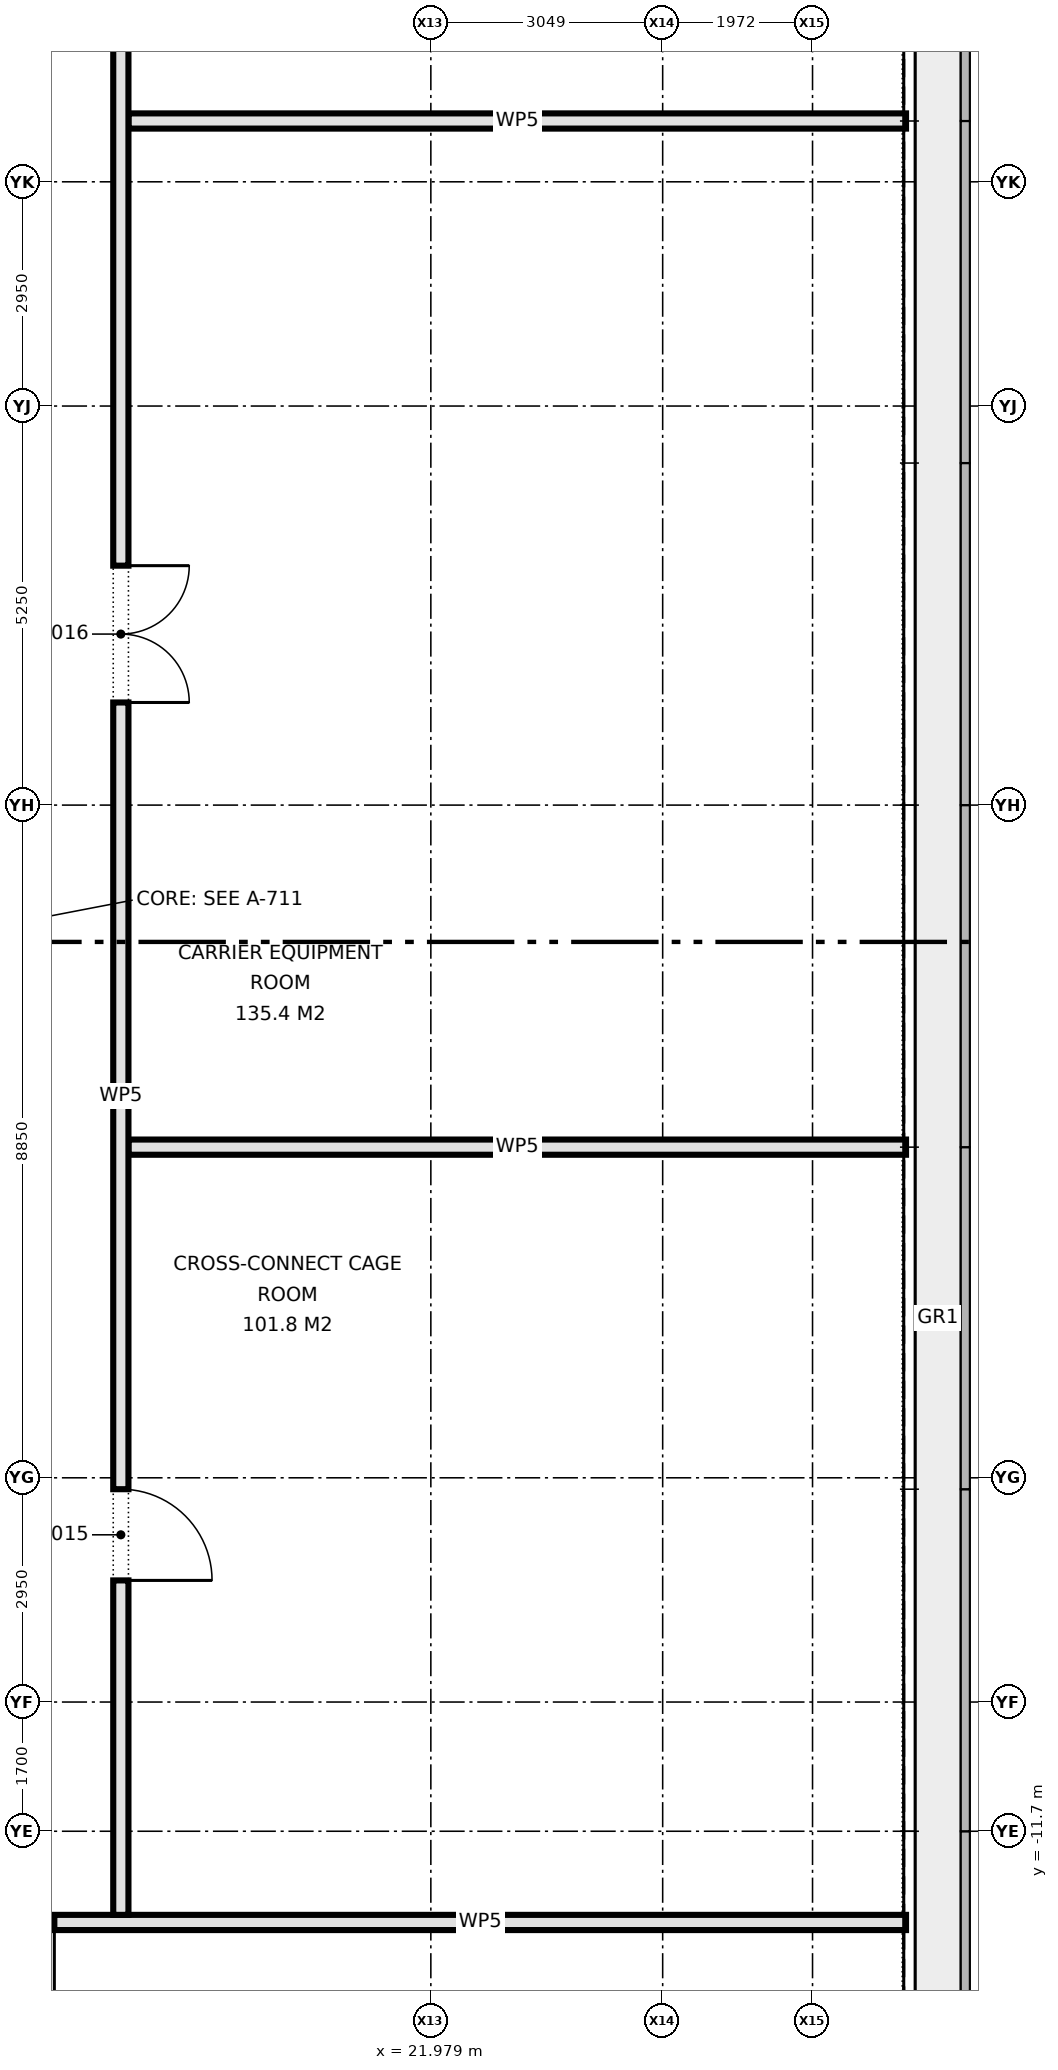
"""IFC4 building model, lengths in metres.
Left out: names, types, materials, properties, quantities, classifications, styles, units other than length and angle.
Written with IfcOpenShell. Run it as: python <this file> out.ifc"""

import sys

from ifc_helpers import new_model, si_unit, direction, frame, frame_2d, origin, place, context, subcontext, project, spatial, rectangle, extrude, element, fill, save


model = new_model("IFC4")
c1 = context("Model", 3, precision=1e-05, world=origin(), true_north=direction((0.0, 1.0)))
c2 = subcontext(c1, "Body", "Model", "MODEL_VIEW")
j1 = project(units=[si_unit("LENGTHUNIT", "METRE"), si_unit("PLANEANGLEUNIT", "RADIAN")], contexts=[c1])
p1 = place(None, origin())
s1 = spatial("IfcSite", under=j1, at=p1, CompositionType="ELEMENT")
p2 = place(p1, origin())
s2 = spatial("IfcBuilding", under=s1, at=p2, CompositionType="ELEMENT")
p3 = place(p2, frame((0.0, 0.0, 73.2)))
s3 = spatial("IfcBuildingStorey", under=s2, at=p3, CompositionType="ELEMENT", Elevation=73.2)
p4 = place(p3, frame((-20.33, -12.9, 0.0), z_axis=(0.0, 0.0, 1.0), x_axis=(1.0, 0.0, 0.0)))
e1 = element("IfcWall", 1, at=p4, inside=s3, PredefinedType="PARTITIONING", context=c2, shape_type="SweptSolid", body=[
    extrude(rectangle(XDim=48.56, YDim=0.2, at=frame_2d((24.28, 0.0))), origin(), (0.0, 0.0, 1.0), 4.2),
])
p5 = place(p4, frame((3.39, 0.0, 0.0)))
e2 = element("IfcOpeningElement", 2, at=p5, cuts=e1, PredefinedType="OPENING", context=c2, shape_type="SweptSolid", body=[
    extrude(rectangle(XDim=1.8, YDim=2.1, at=frame_2d((0.9, 1.05))), frame((0.0, 0.11, 0.0), z_axis=(0.0, -1.0, 0.0), x_axis=(1.0, 0.0, 0.0)), (0.0, 0.0, 1.0), 0.22),
])
p6 = place(p4, frame((15.83, 0.0, 0.0)))
e3 = element("IfcOpeningElement", 3, at=p6, cuts=e1, PredefinedType="OPENING", context=c2, shape_type="SweptSolid", body=[
    extrude(rectangle(XDim=1.8, YDim=2.1, at=frame_2d((0.9, 1.05))), frame((0.0, 0.11, 0.0), z_axis=(0.0, -1.0, 0.0), x_axis=(1.0, 0.0, 0.0)), (0.0, 0.0, 1.0), 0.22),
])
p7 = place(p4, frame((9.38, 0.0, 0.0)))
e4 = element("IfcOpeningElement", 4, at=p7, cuts=e1, PredefinedType="OPENING", context=c2, shape_type="SweptSolid", body=[
    extrude(rectangle(XDim=1.2, YDim=2.1, at=frame_2d((0.6, 1.05))), frame((0.0, 0.11, 0.0), z_axis=(0.0, -1.0, 0.0), x_axis=(1.0, 0.0, 0.0)), (0.0, 0.0, 1.0), 0.22),
])
p8 = place(p4, frame((32.15, 0.0, 0.0)))
e5 = element("IfcOpeningElement", 5, at=p8, cuts=e1, PredefinedType="OPENING", context=c2, shape_type="SweptSolid", body=[
    extrude(rectangle(XDim=1.2, YDim=2.1, at=frame_2d((0.6, 1.05))), frame((0.0, 0.11, 0.0), z_axis=(0.0, -1.0, 0.0), x_axis=(1.0, 0.0, 0.0)), (0.0, 0.0, 1.0), 0.22),
])
p9 = place(p4, frame((36.155, 0.0, 0.0)))
e6 = element("IfcOpeningElement", 6, at=p9, cuts=e1, PredefinedType="OPENING", context=c2, shape_type="SweptSolid", body=[
    extrude(rectangle(XDim=1.2, YDim=2.1, at=frame_2d((0.6, 1.05))), frame((0.0, 0.11, 0.0), z_axis=(0.0, -1.0, 0.0), x_axis=(1.0, 0.0, 0.0)), (0.0, 0.0, 1.0), 0.22),
])
p10 = place(p4, frame((23.03, 0.0, 0.0)))
e7 = element("IfcOpeningElement", 7, at=p10, cuts=e1, PredefinedType="OPENING", context=c2, shape_type="SweptSolid", body=[
    extrude(rectangle(XDim=1.0, YDim=2.1, at=frame_2d((0.5, 1.05))), frame((0.0, 0.11, 0.0), z_axis=(0.0, -1.0, 0.0), x_axis=(1.0, 0.0, 0.0)), (0.0, 0.0, 1.0), 0.22),
])
p11 = place(p4, frame((26.03, 0.0, 0.0)))
e8 = element("IfcOpeningElement", 8, at=p11, cuts=e1, PredefinedType="OPENING", context=c2, shape_type="SweptSolid", body=[
    extrude(rectangle(XDim=1.0, YDim=2.1, at=frame_2d((0.5, 1.05))), frame((0.0, 0.11, 0.0), z_axis=(0.0, -1.0, 0.0), x_axis=(1.0, 0.0, 0.0)), (0.0, 0.0, 1.0), 0.22),
])
p12 = place(p4, frame((28.63, 0.0, 0.0)))
e9 = element("IfcOpeningElement", 9, at=p12, cuts=e1, PredefinedType="OPENING", context=c2, shape_type="SweptSolid", body=[
    extrude(rectangle(XDim=1.0, YDim=2.1, at=frame_2d((0.5, 1.05))), frame((0.0, 0.11, 0.0), z_axis=(0.0, -1.0, 0.0), x_axis=(1.0, 0.0, 0.0)), (0.0, 0.0, 1.0), 0.22),
])
for number, where, z_axis, x_axis in (
    (10, (18.0, -2.7, 0.0), (0.0, 0.0, 1.0), (1.0, 0.0, 0.0)),
    (11, (18.0, 10.8, 0.0), (0.0, 0.0, 1.0), (1.0, 0.0, 0.0)),
):
    element("IfcWall", number, at=place(p3, frame(where, z_axis=z_axis, x_axis=x_axis)), inside=s3, PredefinedType="PARTITIONING", context=c2, shape_type="SweptSolid", body=[
        extrude(rectangle(XDim=10.23, YDim=0.2, at=frame_2d((5.115, 0.0))), origin(), (0.0, 0.0, 1.0), 4.2),
    ])
p13 = place(p3, frame((17.9, -12.8, 0.0), z_axis=(0.0, 0.0, 1.0), x_axis=(0.0, 1.0, 0.0)))
e12 = element("IfcWall", 12, at=p13, inside=s3, PredefinedType="PARTITIONING", context=c2, shape_type="SweptSolid", body=[
    extrude(rectangle(XDim=25.6, YDim=0.2, at=frame_2d((12.8, 0.0))), origin(), (0.0, 0.0, 1.0), 4.2),
])
p14 = place(p13, frame((4.4, 0.0, 0.0)))
e13 = element("IfcOpeningElement", 13, at=p14, cuts=e12, PredefinedType="OPENING", context=c2, shape_type="SweptSolid", body=[
    extrude(rectangle(XDim=1.2, YDim=2.1, at=frame_2d((0.6, 1.05))), frame((0.0, 0.11, 0.0), z_axis=(0.0, -1.0, 0.0), x_axis=(1.0, 0.0, 0.0)), (0.0, 0.0, 1.0), 0.22),
])
p15 = place(p13, frame((15.95, 0.0, 0.0)))
e14 = element("IfcOpeningElement", 14, at=p15, cuts=e12, PredefinedType="OPENING", context=c2, shape_type="SweptSolid", body=[
    extrude(rectangle(XDim=1.8, YDim=2.1, at=frame_2d((0.9, 1.05))), frame((0.0, 0.11, 0.0), z_axis=(0.0, -1.0, 0.0), x_axis=(1.0, 0.0, 0.0)), (0.0, 0.0, 1.0), 0.22),
])
p16 = place(p9, frame((1.2, 0.0, 0.0), z_axis=(0.0, 0.0, 1.0), x_axis=(-1.0, 0.0, 0.0)))
e15 = element("IfcDoor", 15, at=p16, inside=s3, OperationType="SINGLE_SWING_LEFT", PredefinedType="DOOR", context=c2, shape_type="SweptSolid", body=[
    extrude(rectangle(XDim=1.2, YDim=2.1, at=frame_2d((0.6, 1.05))), frame((0.0, 0.025, 0.0), z_axis=(0.0, -1.0, 0.0), x_axis=(1.0, 0.0, 0.0)), (0.0, 0.0, 1.0), 0.05),
])
fill(e6, e15)
p17 = place(p14, frame((1.2, 0.0, 0.0), z_axis=(0.0, 0.0, 1.0), x_axis=(-1.0, 0.0, 0.0)))
e16 = element("IfcDoor", 16, at=p17, inside=s3, OperationType="SINGLE_SWING_RIGHT", PredefinedType="DOOR", context=c2, shape_type="SweptSolid", body=[
    extrude(rectangle(XDim=1.2, YDim=2.1, at=frame_2d((0.6, 1.05))), frame((0.0, 0.025, 0.0), z_axis=(0.0, -1.0, 0.0), x_axis=(1.0, 0.0, 0.0)), (0.0, 0.0, 1.0), 0.05),
])
fill(e13, e16)
p18 = place(p15, frame((1.8, 0.0, 0.0), z_axis=(0.0, 0.0, 1.0), x_axis=(-1.0, 0.0, 0.0)))
e17 = element("IfcDoor", 17, at=p18, inside=s3, OperationType="DOUBLE_DOOR_SINGLE_SWING", PredefinedType="DOOR", context=c2, shape_type="SweptSolid", body=[
    extrude(rectangle(XDim=1.8, YDim=2.1, at=frame_2d((0.9, 1.05))), frame((0.0, 0.025, 0.0), z_axis=(0.0, -1.0, 0.0), x_axis=(1.0, 0.0, 0.0)), (0.0, 0.0, 1.0), 0.05),
])
fill(e14, e17)
save(model, sys.argv[1])
